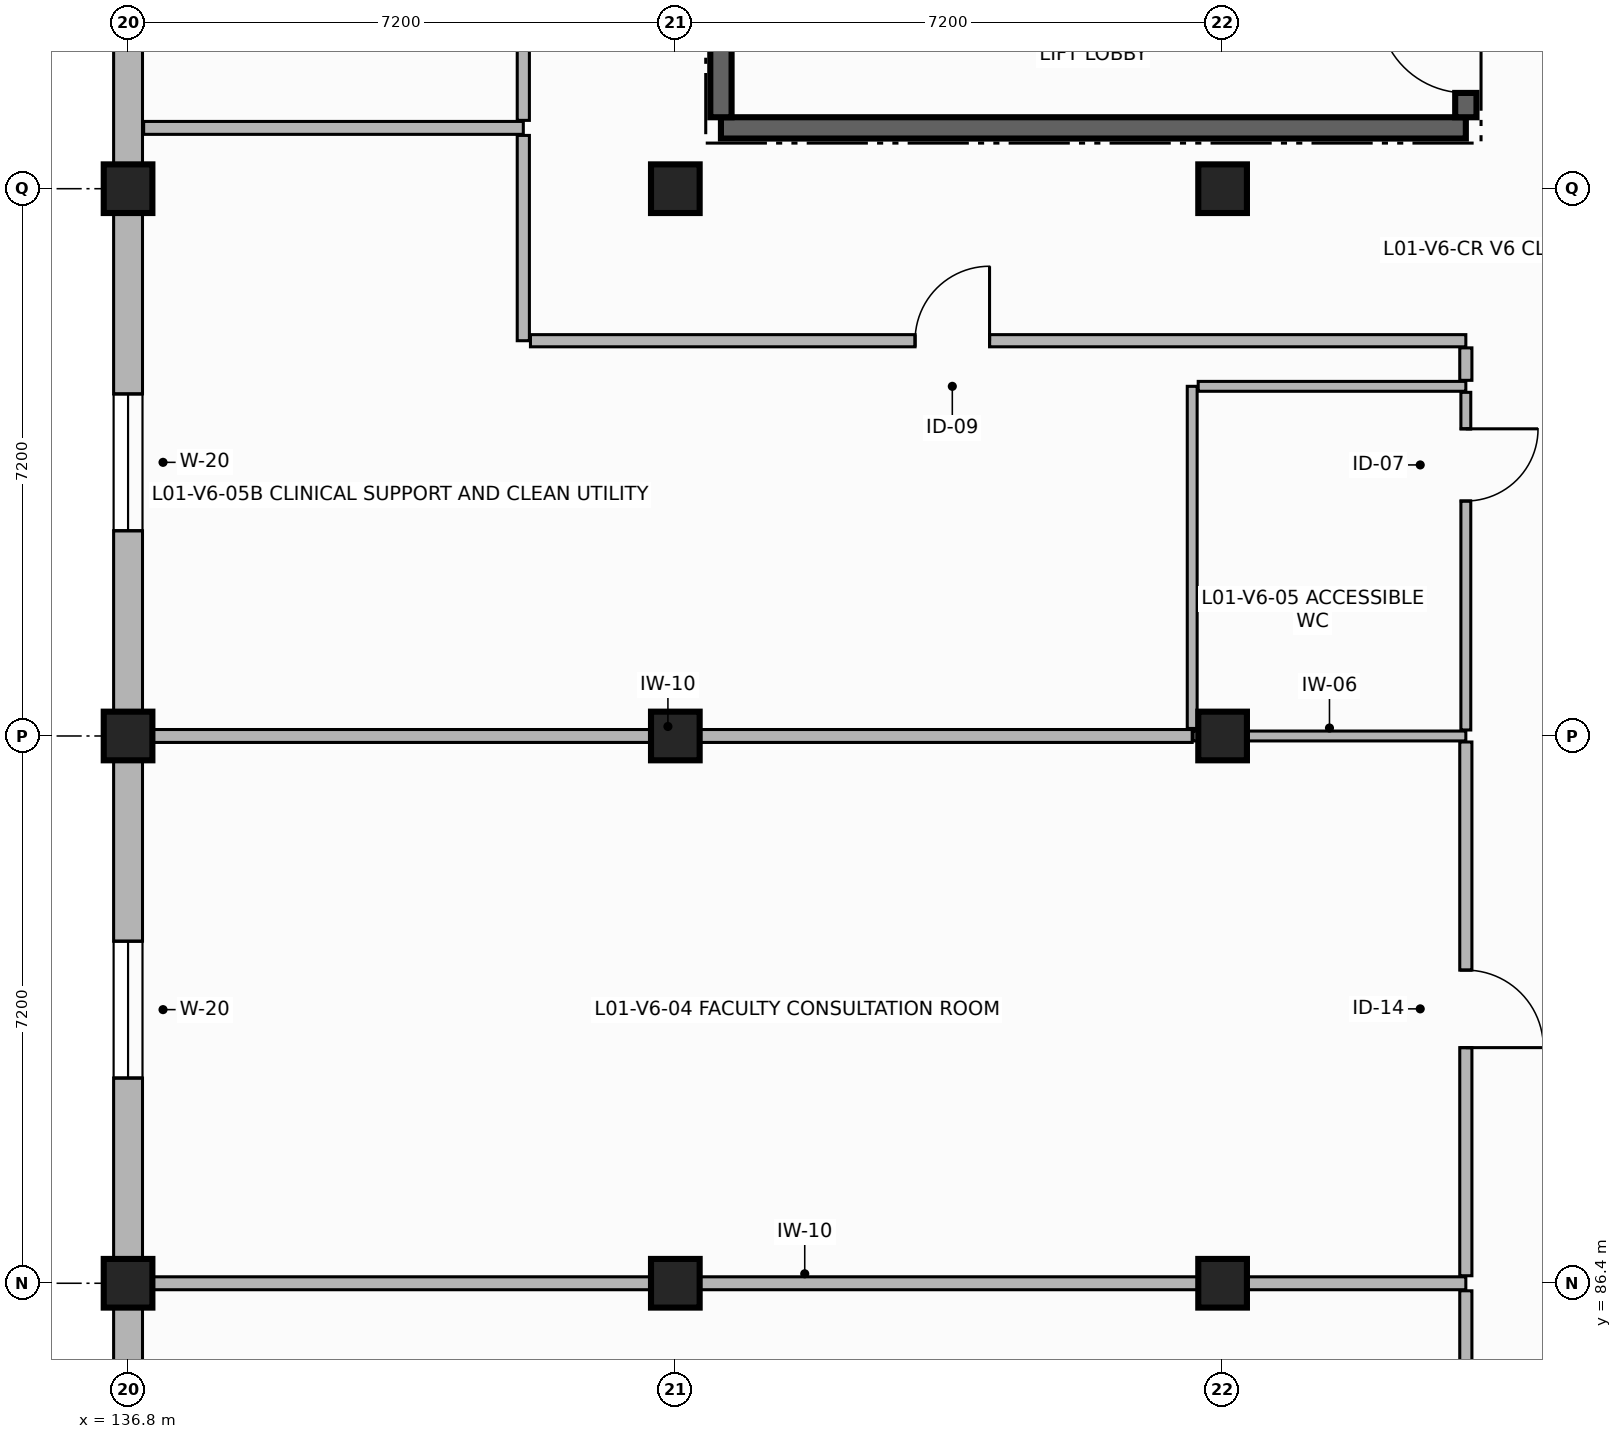
"""IFC4 building model, lengths in metres.
Left out: names, types, materials, properties, quantities, classifications, styles, units other than length and angle.
Written with IfcOpenShell. Run it as: python <this file> out.ifc"""

import sys

from ifc_helpers import new_model, si_unit, direction, frame, frame_2d, origin, origin_2d, place, context, subcontext, project, spatial, rectangle, extrude, element, fill, save


model = new_model("IFC4")
c1 = context("Model", 3, precision=1e-05, world=origin(), true_north=direction((0.0, 1.0)))
c2 = subcontext(c1, "Body", "Model", "MODEL_VIEW")
j1 = project(units=[si_unit("LENGTHUNIT", "METRE"), si_unit("PLANEANGLEUNIT", "RADIAN")], contexts=[c1])
p1 = place(None, origin())
s1 = spatial("IfcSite", under=j1, at=p1, CompositionType="ELEMENT")
p2 = place(p1, origin())
s2 = spatial("IfcBuilding", under=s1, at=p2, CompositionType="ELEMENT")
p3 = place(p2, frame((0.0, 0.0, 4.5)))
s3 = spatial("IfcBuildingStorey", under=s2, at=p3, CompositionType="ELEMENT", Elevation=4.5)
for number, where, z_axis, x_axis in (
    (1, (136.8, 86.4, 0.0), (0.0, 0.0, 1.0), (1.0, 0.0, 0.0)),
    (2, (136.8, 93.6, 0.0), (0.0, 0.0, 1.0), (1.0, 0.0, 0.0)),
    (3, (136.8, 100.8, 0.0), (0.0, 0.0, 1.0), (1.0, 0.0, 0.0)),
    (4, (144.0, 86.4, 0.0), (0.0, 0.0, 1.0), (1.0, 0.0, 0.0)),
    (5, (144.0, 93.6, 0.0), (0.0, 0.0, 1.0), (1.0, 0.0, 0.0)),
    (6, (144.0, 100.8, 0.0), (0.0, 0.0, 1.0), (1.0, 0.0, 0.0)),
    (7, (151.2, 86.4, 0.0), (0.0, 0.0, 1.0), (1.0, 0.0, 0.0)),
    (8, (151.2, 93.6, 0.0), (0.0, 0.0, 1.0), (1.0, 0.0, 0.0)),
    (9, (151.2, 100.8, 0.0), (0.0, 0.0, 1.0), (1.0, 0.0, 0.0)),
):
    element("IfcColumn", number, at=place(p3, frame(where, z_axis=z_axis, x_axis=x_axis)), inside=s3, PredefinedType="COLUMN", context=c2, shape_type="SweptSolid", body=[
        extrude(rectangle(XDim=0.64, YDim=0.64, at=origin_2d()), origin(), (0.0, 0.0, 1.0), 3.58),
    ])
p4 = place(p3, frame((136.8, 108.0, 0.0), z_axis=(0.0, 0.0, 1.0), x_axis=(0.0, -1.0, 0.0)))
e10 = element("IfcWall", 10, at=p4, inside=s3, PredefinedType="SOLIDWALL", context=c2, shape_type="SweptSolid", body=[
    extrude(rectangle(XDim=7.2, YDim=0.38, at=frame_2d((3.6, 0.0))), origin(), (0.0, 0.0, 1.0), 2.91),
])
p5 = place(p4, frame((2.6, 0.0, 0.85)))
e11 = element("IfcOpeningElement", 11, at=p5, cuts=e10, PredefinedType="OPENING", context=c2, shape_type="SweptSolid", body=[
    extrude(rectangle(XDim=1.8, YDim=1.85, at=frame_2d((0.9, 0.925))), frame((0.0, 0.2, 0.0), z_axis=(0.0, -1.0, 0.0), x_axis=(1.0, 0.0, 0.0)), (0.0, 0.0, 1.0), 0.4),
])
p6 = place(p3, frame((136.8, 100.8, 0.0), z_axis=(0.0, 0.0, 1.0), x_axis=(0.0, -1.0, 0.0)))
e12 = element("IfcWall", 12, at=p6, inside=s3, PredefinedType="SOLIDWALL", context=c2, shape_type="SweptSolid", body=[
    extrude(rectangle(XDim=7.2, YDim=0.38, at=frame_2d((3.6, 0.0))), origin(), (0.0, 0.0, 1.0), 2.91),
])
p7 = place(p6, frame((2.7, 0.0, 0.85)))
e13 = element("IfcOpeningElement", 13, at=p7, cuts=e12, PredefinedType="OPENING", context=c2, shape_type="SweptSolid", body=[
    extrude(rectangle(XDim=1.8, YDim=1.85, at=frame_2d((0.9, 0.925))), frame((0.0, 0.2, 0.0), z_axis=(0.0, -1.0, 0.0), x_axis=(1.0, 0.0, 0.0)), (0.0, 0.0, 1.0), 0.4),
])
p8 = place(p3, frame((136.8, 93.6, 0.0), z_axis=(0.0, 0.0, 1.0), x_axis=(0.0, -1.0, 0.0)))
e14 = element("IfcWall", 14, at=p8, inside=s3, PredefinedType="SOLIDWALL", context=c2, shape_type="SweptSolid", body=[
    extrude(rectangle(XDim=7.2, YDim=0.38, at=frame_2d((3.6, 0.0))), origin(), (0.0, 0.0, 1.0), 2.91),
])
p9 = place(p8, frame((2.7, 0.0, 0.85)))
e15 = element("IfcOpeningElement", 15, at=p9, cuts=e14, PredefinedType="OPENING", context=c2, shape_type="SweptSolid", body=[
    extrude(rectangle(XDim=1.8, YDim=1.85, at=frame_2d((0.9, 0.925))), frame((0.0, 0.2, 0.0), z_axis=(0.0, -1.0, 0.0), x_axis=(1.0, 0.0, 0.0)), (0.0, 0.0, 1.0), 0.4),
])
p10 = place(p3, frame((136.8, 86.4, 0.0), z_axis=(0.0, 0.0, 1.0), x_axis=(0.0, -1.0, 0.0)))
e16 = element("IfcWall", 16, at=p10, inside=s3, PredefinedType="SOLIDWALL", context=c2, shape_type="SweptSolid", body=[
    extrude(rectangle(XDim=7.2, YDim=0.38, at=frame_2d((3.6, 0.0))), origin(), (0.0, 0.0, 1.0), 2.91),
])
p11 = place(p10, frame((2.7, 0.0, 0.85)))
e17 = element("IfcOpeningElement", 17, at=p11, cuts=e16, PredefinedType="OPENING", context=c2, shape_type="SweptSolid", body=[
    extrude(rectangle(XDim=1.8, YDim=1.85, at=frame_2d((0.9, 0.925))), frame((0.0, 0.2, 0.0), z_axis=(0.0, -1.0, 0.0), x_axis=(1.0, 0.0, 0.0)), (0.0, 0.0, 1.0), 0.4),
])
p12 = place(p3, frame((144.6, 101.6, 0.0), z_axis=(0.0, 0.0, 1.0), x_axis=(1.0, 0.0, 0.0)))
e18 = element("IfcWall", 18, at=p12, inside=s3, PredefinedType="SHEAR", context=c2, shape_type="SweptSolid", body=[
    extrude(rectangle(XDim=9.8, YDim=0.28, at=frame_2d((4.9, 0.0))), origin(), (0.0, 0.0, 1.0), 3.58),
])
p13 = place(p3, frame((154.4, 101.74, 0.0), z_axis=(0.0, 0.0, 1.0), x_axis=(0.0, 1.0, 0.0)))
e19 = element("IfcWall", 19, at=p13, inside=s3, PredefinedType="SHEAR", context=c2, shape_type="SweptSolid", body=[
    extrude(rectangle(XDim=5.52, YDim=0.28, at=frame_2d((2.76, 0.0))), origin(), (0.0, 0.0, 1.0), 3.58),
])
p14 = place(p13, frame((0.32, 0.0, 0.0)))
e20 = element("IfcOpeningElement", 20, at=p14, cuts=e19, PredefinedType="OPENING", context=c2, shape_type="SweptSolid", body=[
    extrude(rectangle(XDim=1.15, YDim=2.2, at=frame_2d((0.575, 1.1))), frame((0.0, 0.15, 0.0), z_axis=(0.0, -1.0, 0.0), x_axis=(1.0, 0.0, 0.0)), (0.0, 0.0, 1.0), 0.3),
])
p15 = place(p3, frame((144.6, 107.26, 0.0), z_axis=(0.0, 0.0, 1.0), x_axis=(0.0, -1.0, 0.0)))
e21 = element("IfcWall", 21, at=p15, inside=s3, PredefinedType="SHEAR", context=c2, shape_type="SweptSolid", body=[
    extrude(rectangle(XDim=5.52, YDim=0.28, at=frame_2d((2.76, 0.0))), origin(), (0.0, 0.0, 1.0), 3.58),
])
p16 = place(p3, frame((137.005, 86.4, 0.0), z_axis=(0.0, 0.0, 1.0), x_axis=(1.0, 0.0, 0.0)))
e22 = element("IfcWall", 22, at=p16, inside=s3, PredefinedType="PARTITIONING", context=c2, shape_type="SweptSolid", body=[
    extrude(rectangle(XDim=17.395, YDim=0.17, at=frame_2d((8.698, 0.0))), origin(), (0.0, 0.0, 1.0), 2.89),
])
p17 = place(p3, frame((154.4, 86.301, 0.0), z_axis=(0.0, 0.0, 1.0), x_axis=(0.0, -1.0, 0.0)))
e23 = element("IfcWall", 23, at=p17, inside=s3, PredefinedType="PARTITIONING", context=c2, shape_type="SweptSolid", body=[
    extrude(rectangle(XDim=7.546, YDim=0.16, at=frame_2d((3.773, 0.0))), origin(), (0.0, 0.0, 1.0), 2.89),
])
p18 = place(p17, frame((2.86, 0.0, 0.0)))
e24 = element("IfcOpeningElement", 24, at=p18, cuts=e23, PredefinedType="OPENING", context=c2, shape_type="SweptSolid", body=[
    extrude(rectangle(XDim=1.35, YDim=2.25, at=frame_2d((0.675, 1.125))), frame((0.0, 0.09, 0.0), z_axis=(0.0, -1.0, 0.0), x_axis=(1.0, 0.0, 0.0)), (0.0, 0.0, 1.0), 0.18),
])
p19 = place(p3, frame((137.005, 93.6, 0.0), z_axis=(0.0, 0.0, 1.0), x_axis=(1.0, 0.0, 0.0)))
e25 = element("IfcWall", 25, at=p19, inside=s3, PredefinedType="PARTITIONING", context=c2, shape_type="SweptSolid", body=[
    extrude(rectangle(XDim=13.795, YDim=0.17, at=frame_2d((6.897, 0.0))), origin(), (0.0, 0.0, 1.0), 2.89),
])
p20 = place(p3, frame((150.812, 93.6, 0.0), z_axis=(0.0, 0.0, 1.0), x_axis=(1.0, 0.0, 0.0)))
e26 = element("IfcWall", 26, at=p20, inside=s3, PredefinedType="PARTITIONING", context=c2, shape_type="SweptSolid", body=[
    extrude(rectangle(XDim=3.588, YDim=0.13, at=frame_2d((1.794, 0.0))), origin(), (0.0, 0.0, 1.0), 2.89),
])
p21 = place(p3, frame((154.4, 93.521, 0.0), z_axis=(0.0, 0.0, 1.0), x_axis=(0.0, -1.0, 0.0)))
e27 = element("IfcWall", 27, at=p21, inside=s3, PredefinedType="PARTITIONING", context=c2, shape_type="SweptSolid", body=[
    extrude(rectangle(XDim=7.022, YDim=0.16, at=frame_2d((3.511, 0.0))), origin(), (0.0, 0.0, 1.0), 2.89),
])
p22 = place(p21, frame((3.001, 0.0, 0.0)))
e28 = element("IfcOpeningElement", 28, at=p22, cuts=e27, PredefinedType="OPENING", context=c2, shape_type="SweptSolid", body=[
    extrude(rectangle(XDim=1.02, YDim=2.15, at=frame_2d((0.51, 1.075))), frame((0.0, 0.09, 0.0), z_axis=(0.0, -1.0, 0.0), x_axis=(1.0, 0.0, 0.0)), (0.0, 0.0, 1.0), 0.18),
])
p23 = place(p3, frame((150.8, 93.699, 0.0), z_axis=(0.0, 0.0, 1.0), x_axis=(0.0, 1.0, 0.0)))
e29 = element("IfcWall", 29, at=p23, inside=s3, PredefinedType="PARTITIONING", context=c2, shape_type="SweptSolid", body=[
    extrude(rectangle(XDim=4.501, YDim=0.13, at=frame_2d((2.25, 0.0))), origin(), (0.0, 0.0, 1.0), 2.89),
])
p24 = place(p3, frame((150.879, 98.2, 0.0), z_axis=(0.0, 0.0, 1.0), x_axis=(1.0, 0.0, 0.0)))
e30 = element("IfcWall", 30, at=p24, inside=s3, PredefinedType="PARTITIONING", context=c2, shape_type="SweptSolid", body=[
    extrude(rectangle(XDim=3.521, YDim=0.13, at=frame_2d((1.76, 0.0))), origin(), (0.0, 0.0, 1.0), 2.89),
])
p25 = place(p3, frame((154.4, 98.121, 0.0), z_axis=(0.0, 0.0, 1.0), x_axis=(0.0, -1.0, 0.0)))
e31 = element("IfcWall", 31, at=p25, inside=s3, PredefinedType="PARTITIONING", context=c2, shape_type="SweptSolid", body=[
    extrude(rectangle(XDim=4.442, YDim=0.13, at=frame_2d((2.221, 0.0))), origin(), (0.0, 0.0, 1.0), 2.89),
])
p26 = place(p25, frame((0.48, 0.0, 0.0)))
e32 = element("IfcOpeningElement", 32, at=p26, cuts=e31, PredefinedType="OPENING", context=c2, shape_type="SweptSolid", body=[
    extrude(rectangle(XDim=0.95, YDim=2.1, at=frame_2d((0.475, 1.05))), frame((0.0, 0.075, 0.0), z_axis=(0.0, -1.0, 0.0), x_axis=(1.0, 0.0, 0.0)), (0.0, 0.0, 1.0), 0.15),
])
p27 = place(p3, frame((137.005, 101.6, 0.0), z_axis=(0.0, 0.0, 1.0), x_axis=(1.0, 0.0, 0.0)))
e33 = element("IfcWall", 33, at=p27, inside=s3, PredefinedType="PARTITIONING", context=c2, shape_type="SweptSolid", body=[
    extrude(rectangle(XDim=4.995, YDim=0.17, at=frame_2d((2.498, 0.0))), origin(), (0.0, 0.0, 1.0), 2.89),
])
p28 = place(p3, frame((142.0, 101.501, 0.0), z_axis=(0.0, 0.0, 1.0), x_axis=(0.0, -1.0, 0.0)))
e34 = element("IfcWall", 34, at=p28, inside=s3, PredefinedType="PARTITIONING", context=c2, shape_type="SweptSolid", body=[
    extrude(rectangle(XDim=2.701, YDim=0.16, at=frame_2d((1.351, 0.0))), origin(), (0.0, 0.0, 1.0), 2.89),
])
p29 = place(p3, frame((142.094, 98.8, 0.0), z_axis=(0.0, 0.0, 1.0), x_axis=(1.0, 0.0, 0.0)))
e35 = element("IfcWall", 35, at=p29, inside=s3, PredefinedType="PARTITIONING", context=c2, shape_type="SweptSolid", body=[
    extrude(rectangle(XDim=12.306, YDim=0.16, at=frame_2d((6.153, 0.0))), origin(), (0.0, 0.0, 1.0), 2.89),
])
p30 = place(p29, frame((5.06, 0.0, 0.0)))
e36 = element("IfcOpeningElement", 36, at=p30, cuts=e35, PredefinedType="OPENING", context=c2, shape_type="SweptSolid", body=[
    extrude(rectangle(XDim=0.98, YDim=2.15, at=frame_2d((0.49, 1.075))), frame((0.0, 0.09, 0.0), z_axis=(0.0, -1.0, 0.0), x_axis=(1.0, 0.0, 0.0)), (0.0, 0.0, 1.0), 0.18),
])
p31 = place(p3, frame((154.4, 98.706, 0.0), z_axis=(0.0, 0.0, 1.0), x_axis=(0.0, -1.0, 0.0)))
e37 = element("IfcWall", 37, at=p31, inside=s3, PredefinedType="PARTITIONING", context=c2, shape_type="SweptSolid", body=[
    extrude(rectangle(XDim=0.427, YDim=0.16, at=frame_2d((0.213, 0.0))), origin(), (0.0, 0.0, 1.0), 2.89),
])
p32 = place(p3, frame((142.0, 107.301, 0.0), z_axis=(0.0, 0.0, 1.0), x_axis=(0.0, -1.0, 0.0)))
e38 = element("IfcWall", 38, at=p32, inside=s3, PredefinedType="PARTITIONING", context=c2, shape_type="SweptSolid", body=[
    extrude(rectangle(XDim=5.602, YDim=0.16, at=frame_2d((2.801, 0.0))), origin(), (0.0, 0.0, 1.0), 2.89),
])
p33 = place(p32, frame((2.311, 0.0, 0.0)))
e39 = element("IfcOpeningElement", 39, at=p33, cuts=e38, PredefinedType="OPENING", context=c2, shape_type="SweptSolid", body=[
    extrude(rectangle(XDim=0.98, YDim=2.15, at=frame_2d((0.49, 1.075))), frame((0.0, 0.09, 0.0), z_axis=(0.0, -1.0, 0.0), x_axis=(1.0, 0.0, 0.0)), (0.0, 0.0, 1.0), 0.18),
])
p34 = place(p7, origin())
e40 = element("IfcWindow", 40, at=p34, inside=s3, PartitioningType="SINGLE_PANEL", PredefinedType="WINDOW", context=c2, shape_type="SweptSolid", body=[
    extrude(rectangle(XDim=1.8, YDim=1.85, at=frame_2d((0.9, 0.925))), frame((0.0, 0.03, 0.0), z_axis=(0.0, -1.0, 0.0), x_axis=(1.0, 0.0, 0.0)), (0.0, 0.0, 1.0), 0.06),
])
fill(e13, e40)
p35 = place(p9, origin())
e41 = element("IfcWindow", 41, at=p35, inside=s3, PartitioningType="SINGLE_PANEL", PredefinedType="WINDOW", context=c2, shape_type="SweptSolid", body=[
    extrude(rectangle(XDim=1.8, YDim=1.85, at=frame_2d((0.9, 0.925))), frame((0.0, 0.03, 0.0), z_axis=(0.0, -1.0, 0.0), x_axis=(1.0, 0.0, 0.0)), (0.0, 0.0, 1.0), 0.06),
])
fill(e15, e41)
p36 = place(p14, origin())
e42 = element("IfcDoor", 42, at=p36, inside=s3, OperationType="SINGLE_SWING_RIGHT", PredefinedType="DOOR", context=c2, shape_type="SweptSolid", body=[
    extrude(rectangle(XDim=1.15, YDim=2.2, at=frame_2d((0.575, 1.1))), frame((0.0, 0.025, 0.0), z_axis=(0.0, -1.0, 0.0), x_axis=(1.0, 0.0, 0.0)), (0.0, 0.0, 1.0), 0.05),
])
fill(e20, e42)
p37 = place(p22, origin())
e43 = element("IfcDoor", 43, at=p37, inside=s3, OperationType="SINGLE_SWING_RIGHT", PredefinedType="DOOR", context=c2, shape_type="SweptSolid", body=[
    extrude(rectangle(XDim=1.02, YDim=2.15, at=frame_2d((0.51, 1.075))), frame((0.0, 0.025, 0.0), z_axis=(0.0, -1.0, 0.0), x_axis=(1.0, 0.0, 0.0)), (0.0, 0.0, 1.0), 0.05),
])
fill(e28, e43)
p38 = place(p26, origin())
e44 = element("IfcDoor", 44, at=p38, inside=s3, OperationType="SINGLE_SWING_LEFT", PredefinedType="DOOR", context=c2, shape_type="SweptSolid", body=[
    extrude(rectangle(XDim=0.95, YDim=2.1, at=frame_2d((0.475, 1.05))), frame((0.0, 0.025, 0.0), z_axis=(0.0, -1.0, 0.0), x_axis=(1.0, 0.0, 0.0)), (0.0, 0.0, 1.0), 0.05),
])
fill(e32, e44)
p39 = place(p30, origin())
e45 = element("IfcDoor", 45, at=p39, inside=s3, OperationType="SINGLE_SWING_RIGHT", PredefinedType="DOOR", context=c2, shape_type="SweptSolid", body=[
    extrude(rectangle(XDim=0.98, YDim=2.15, at=frame_2d((0.49, 1.075))), frame((0.0, 0.025, 0.0), z_axis=(0.0, -1.0, 0.0), x_axis=(1.0, 0.0, 0.0)), (0.0, 0.0, 1.0), 0.05),
])
fill(e36, e45)
save(model, sys.argv[1])
